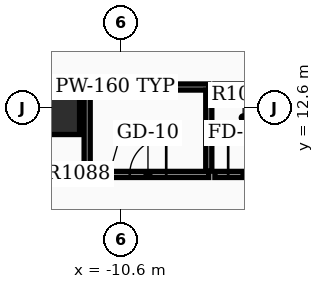
"""IFC4 building model, lengths in metres.
Left out: names, types, materials, properties, quantities, classifications, styles, units other than length and angle.
Written with IfcOpenShell. Run it as: python <this file> out.ifc"""

import sys

from ifc_helpers import new_model, si_unit, direction, frame, frame_2d, origin, origin_2d, place, context, subcontext, project, spatial, rectangle, extrude, element, fill, save


model = new_model("IFC4")
c1 = context("Model", 3, precision=1e-05, world=origin(), true_north=direction((0.0, 1.0)))
c2 = subcontext(c1, "Body", "Model", "MODEL_VIEW")
j1 = project(units=[si_unit("LENGTHUNIT", "METRE"), si_unit("PLANEANGLEUNIT", "RADIAN")], contexts=[c1])
p1 = place(None, origin())
s1 = spatial("IfcSite", under=j1, at=p1, CompositionType="ELEMENT")
p2 = place(p1, origin())
s2 = spatial("IfcBuilding", under=s1, at=p2, CompositionType="ELEMENT")
p3 = place(p2, frame((0.0, 0.0, 71.7)))
s3 = spatial("IfcBuildingStorey", under=s2, at=p3, CompositionType="ELEMENT", Elevation=71.7)
p4 = place(p3, frame((-12.4, 12.6, 0.0), z_axis=(0.0, 0.0, 1.0), x_axis=(1.0, 0.0, 0.0)))
e1 = element("IfcColumn", 1, at=p4, inside=s3, PredefinedType="COLUMN", context=c2, shape_type="SweptSolid", body=[
    extrude(rectangle(XDim=1.4, YDim=1.4, at=origin_2d()), origin(), (0.0, 0.0, 1.0), 3.9),
])
p5 = place(p3, frame((-11.5, 10.85, 0.0), z_axis=(0.0, 0.0, 1.0), x_axis=(1.0, 0.0, 0.0)))
e2 = element("IfcWall", 2, at=p5, inside=s3, PredefinedType="PARTITIONING", context=c2, shape_type="SweptSolid", body=[
    extrude(rectangle(XDim=3.2, YDim=0.16, at=frame_2d((1.6, 0.0))), origin(), (0.0, 0.0, 1.0), 2.9),
])
p6 = place(p5, frame((1.12, 0.0, 0.0)))
e3 = element("IfcOpeningElement", 3, at=p6, cuts=e2, PredefinedType="OPENING", context=c2, shape_type="SweptSolid", body=[
    extrude(rectangle(XDim=0.96, YDim=2.15, at=frame_2d((0.48, 1.075))), frame((0.0, 0.09, 0.0), z_axis=(0.0, -1.0, 0.0), x_axis=(1.0, 0.0, 0.0)), (0.0, 0.0, 1.0), 0.18),
])
p7 = place(p3, frame((-11.5, 13.15, 0.0), z_axis=(0.0, 0.0, 1.0), x_axis=(1.0, 0.0, 0.0)))
e4 = element("IfcWall", 4, at=p7, inside=s3, PredefinedType="PARTITIONING", context=c2, shape_type="SweptSolid", body=[
    extrude(rectangle(XDim=3.2, YDim=0.16, at=frame_2d((1.6, 0.0))), origin(), (0.0, 0.0, 1.0), 2.9),
])
for number, where, z_axis, x_axis in (
    (5, (-11.5, 10.935, 0.0), (0.0, 0.0, 1.0), (0.0, 1.0, 0.0)),
    (6, (-8.3, 10.935, 0.0), (0.0, 0.0, 1.0), (0.0, 1.0, 0.0)),
):
    element("IfcWall", number, at=place(p3, frame(where, z_axis=z_axis, x_axis=x_axis)), inside=s3, PredefinedType="PARTITIONING", context=c2, shape_type="SweptSolid", body=[
        extrude(rectangle(XDim=2.13, YDim=0.16, at=frame_2d((1.065, 0.0))), origin(), (0.0, 0.0, 1.0), 2.9),
    ])
p8 = place(p3, frame((-8.14, 10.85, 0.0), z_axis=(0.0, 0.0, 1.0), x_axis=(1.0, 0.0, 0.0)))
e7 = element("IfcWall", 7, at=p8, inside=s3, PredefinedType="PARTITIONING", context=c2, shape_type="SweptSolid", body=[
    extrude(rectangle(XDim=1.49, YDim=0.16, at=frame_2d((0.745, 0.0))), origin(), (0.0, 0.0, 1.0), 2.9),
])
p9 = place(p8, frame((0.35, 0.0, 0.0)))
e8 = element("IfcOpeningElement", 8, at=p9, cuts=e7, PredefinedType="OPENING", context=c2, shape_type="SweptSolid", body=[
    extrude(rectangle(XDim=0.88, YDim=2.1, at=frame_2d((0.44, 1.05))), frame((0.0, 0.09, 0.0), z_axis=(0.0, -1.0, 0.0), x_axis=(1.0, 0.0, 0.0)), (0.0, 0.0, 1.0), 0.18),
])
p10 = place(p3, frame((-8.14, 13.15, 0.0), z_axis=(0.0, 0.0, 1.0), x_axis=(1.0, 0.0, 0.0)))
e9 = element("IfcWall", 9, at=p10, inside=s3, PredefinedType="PARTITIONING", context=c2, shape_type="SweptSolid", body=[
    extrude(rectangle(XDim=1.49, YDim=0.16, at=frame_2d((0.745, 0.0))), origin(), (0.0, 0.0, 1.0), 2.9),
])
p11 = place(p6, origin())
e10 = element("IfcDoor", 10, at=p11, inside=s3, OperationType="SINGLE_SWING_RIGHT", PredefinedType="DOOR", context=c2, shape_type="SweptSolid", body=[
    extrude(rectangle(XDim=0.96, YDim=2.15, at=frame_2d((0.48, 1.075))), frame((0.0, 0.025, 0.0), z_axis=(0.0, -1.0, 0.0), x_axis=(1.0, 0.0, 0.0)), (0.0, 0.0, 1.0), 0.05),
])
fill(e3, e10)
p12 = place(p9, origin())
e11 = element("IfcDoor", 11, at=p12, inside=s3, OperationType="SINGLE_SWING_LEFT", PredefinedType="DOOR", context=c2, shape_type="SweptSolid", body=[
    extrude(rectangle(XDim=0.88, YDim=2.1, at=frame_2d((0.44, 1.05))), frame((0.0, 0.025, 0.0), z_axis=(0.0, -1.0, 0.0), x_axis=(1.0, 0.0, 0.0)), (0.0, 0.0, 1.0), 0.05),
])
fill(e8, e11)
save(model, sys.argv[1])
